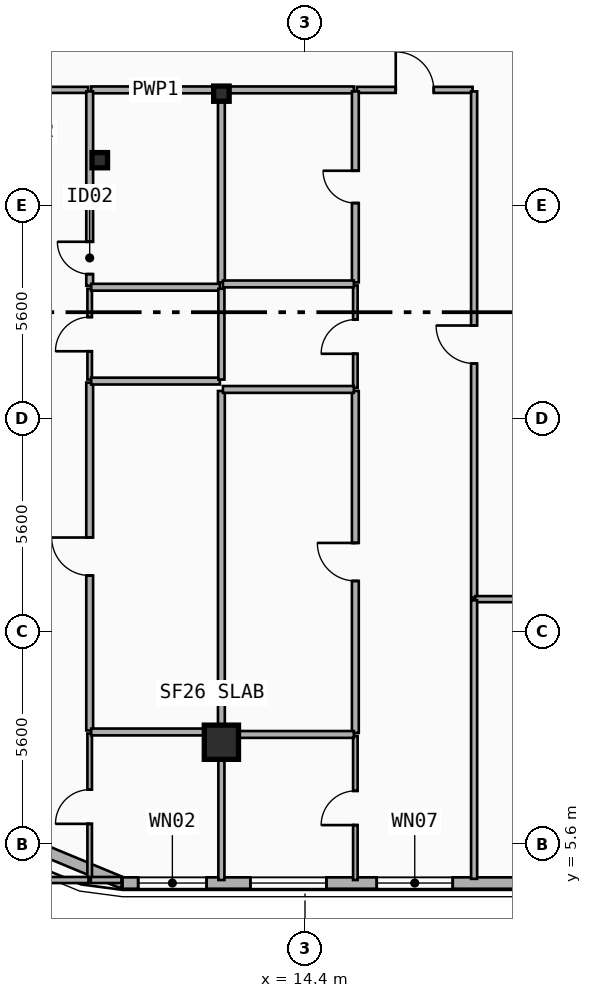
"""IFC4 building model, lengths in metres.
Left out: names, types, materials, properties, quantities, classifications, styles, units other than length and angle.
Written with IfcOpenShell. Run it as: python <this file> out.ifc"""

import sys

from ifc_helpers import new_model, si_unit, direction, frame, frame_2d, origin, origin_2d, place, context, subcontext, project, spatial, rectangle, i_section, extrude, element, fill, save


model = new_model("IFC4")
c1 = context("Model", 3, precision=1e-05, world=origin(), true_north=direction((0.0, 1.0)))
c2 = subcontext(c1, "Body", "Model", "MODEL_VIEW")
j1 = project(units=[si_unit("LENGTHUNIT", "METRE"), si_unit("PLANEANGLEUNIT", "RADIAN")], contexts=[c1])
p1 = place(None, origin())
s1 = spatial("IfcSite", under=j1, at=p1, CompositionType="ELEMENT")
p2 = place(p1, origin())
s2 = spatial("IfcBuilding", under=s1, at=p2, CompositionType="ELEMENT")
p3 = place(p2, frame((0.0, 0.0, 196.8)))
s3 = spatial("IfcBuildingStorey", under=s2, at=p3, CompositionType="ELEMENT", Elevation=196.8)
p4 = place(p3, frame((12.2, 25.35, 0.0), z_axis=(0.0, 0.0, 1.0), x_axis=(1.0, 0.0, 0.0)))
e1 = element("IfcColumn", 1, at=p4, inside=s3, PredefinedType="COLUMN", context=c2, shape_type="SweptSolid", body=[
    extrude(i_section(OverallWidth=0.408, OverallDepth=0.4, WebThickness=0.025, FlangeThickness=0.039, FilletRadius=0.015, at=origin_2d()), origin(), (0.0, 0.0, 1.0), 3.6),
])
p5 = place(p3, frame((12.2, 8.394, 0.0), z_axis=(0.0, -0.090304327479, 0.99591421741), x_axis=(1.0, 0.0, 0.0)))
e2 = element("IfcColumn", 2, at=p5, inside=s3, PredefinedType="COLUMN", context=c2, shape_type="SweptSolid", body=[
    extrude(rectangle(XDim=0.9, YDim=0.9, at=origin_2d()), origin(), (0.0, 0.0, 1.0), 3.615),
])
p6 = place(p3, frame((9.0, 23.6, 0.0), z_axis=(0.0, 0.0, 1.0), x_axis=(1.0, 0.0, 0.0)))
e3 = element("IfcColumn", 3, at=p6, inside=s3, PredefinedType="COLUMN", context=c2, shape_type="SweptSolid", body=[
    extrude(i_section(OverallWidth=0.408, OverallDepth=0.4, WebThickness=0.025, FlangeThickness=0.039, FilletRadius=0.015, at=origin_2d()), origin(), (0.0, 0.0, 1.0), 3.6),
])
p7 = place(p3, frame((9.6, 4.58, 0.0), z_axis=(0.0, 0.0, 1.0), x_axis=(-0.923910464346, 0.382608747773, 0.0)))
e4 = element("IfcWall", 4, at=p7, inside=s3, PredefinedType="SOLIDWALL", context=c2, shape_type="SweptSolid", body=[
    extrude(rectangle(XDim=3.077, YDim=0.3, at=frame_2d((1.539, 0.0))), origin(), (0.0, 0.0, 1.0), 3.34),
])
p8 = place(p3, frame((48.0, 4.58, 0.0), z_axis=(0.0, 0.0, 1.0), x_axis=(-1.0, 0.0, 0.0)))
e5 = element("IfcWall", 5, at=p8, inside=s3, PredefinedType="SOLIDWALL", context=c2, shape_type="SweptSolid", body=[
    extrude(rectangle(XDim=38.4, YDim=0.3, at=frame_2d((19.2, 0.0))), origin(), (0.0, 0.0, 1.0), 3.34),
])
p9 = place(p8, frame((36.19, 0.0, 0.8)))
e6 = element("IfcOpeningElement", 6, at=p9, cuts=e5, PredefinedType="OPENING", context=c2, shape_type="SweptSolid", body=[
    extrude(rectangle(XDim=1.8, YDim=1.8, at=frame_2d((0.9, 0.9))), frame((0.0, 0.16, 0.0), z_axis=(0.0, -1.0, 0.0), x_axis=(1.0, 0.0, 0.0)), (0.0, 0.0, 1.0), 0.32),
])
p10 = place(p8, frame((29.712, 0.0, 0.7)))
e7 = element("IfcOpeningElement", 7, at=p10, cuts=e5, PredefinedType="OPENING", context=c2, shape_type="SweptSolid", body=[
    extrude(rectangle(XDim=2.0, YDim=2.2, at=frame_2d((1.0, 1.1))), frame((0.0, 0.16, 0.0), z_axis=(0.0, -1.0, 0.0), x_axis=(1.0, 0.0, 0.0)), (0.0, 0.0, 1.0), 0.32),
])
p11 = place(p8, frame((33.038, 0.0, 0.7)))
e8 = element("IfcOpeningElement", 8, at=p11, cuts=e5, PredefinedType="OPENING", context=c2, shape_type="SweptSolid", body=[
    extrude(rectangle(XDim=2.0, YDim=2.2, at=frame_2d((1.0, 1.1))), frame((0.0, 0.16, 0.0), z_axis=(0.0, -1.0, 0.0), x_axis=(1.0, 0.0, 0.0)), (0.0, 0.0, 1.0), 0.32),
])
p12 = place(p8, frame((20.0, 0.0, 0.7)))
e9 = element("IfcOpeningElement", 9, at=p12, cuts=e5, PredefinedType="OPENING", context=c2, shape_type="SweptSolid", body=[
    extrude(rectangle(XDim=2.0, YDim=2.2, at=frame_2d((1.0, 1.1))), frame((0.0, 0.16, 0.0), z_axis=(0.0, -1.0, 0.0), x_axis=(1.0, 0.0, 0.0)), (0.0, 0.0, 1.0), 0.32),
])
p13 = place(p8, frame((25.2, 0.0, 0.7)))
e10 = element("IfcOpeningElement", 10, at=p13, cuts=e5, PredefinedType="OPENING", context=c2, shape_type="SweptSolid", body=[
    extrude(rectangle(XDim=2.0, YDim=2.2, at=frame_2d((1.0, 1.1))), frame((0.0, 0.16, 0.0), z_axis=(0.0, -1.0, 0.0), x_axis=(1.0, 0.0, 0.0)), (0.0, 0.0, 1.0), 0.32),
])
p14 = place(p8, frame((13.4, 0.0, 0.7)))
e11 = element("IfcOpeningElement", 11, at=p14, cuts=e5, PredefinedType="OPENING", context=c2, shape_type="SweptSolid", body=[
    extrude(rectangle(XDim=2.0, YDim=2.2, at=frame_2d((1.0, 1.1))), frame((0.0, 0.16, 0.0), z_axis=(0.0, -1.0, 0.0), x_axis=(1.0, 0.0, 0.0)), (0.0, 0.0, 1.0), 0.32),
])
p15 = place(p8, frame((6.993, 0.0, 0.7)))
e12 = element("IfcOpeningElement", 12, at=p15, cuts=e5, PredefinedType="OPENING", context=c2, shape_type="SweptSolid", body=[
    extrude(rectangle(XDim=2.0, YDim=2.2, at=frame_2d((1.0, 1.1))), frame((0.0, 0.16, 0.0), z_axis=(0.0, -1.0, 0.0), x_axis=(1.0, 0.0, 0.0)), (0.0, 0.0, 1.0), 0.32),
])
p16 = place(p8, frame((3.469, 0.0, 0.7)))
e13 = element("IfcOpeningElement", 13, at=p16, cuts=e5, PredefinedType="OPENING", context=c2, shape_type="SweptSolid", body=[
    extrude(rectangle(XDim=2.0, YDim=2.2, at=frame_2d((1.0, 1.1))), frame((0.0, 0.16, 0.0), z_axis=(0.0, -1.0, 0.0), x_axis=(1.0, 0.0, 0.0)), (0.0, 0.0, 1.0), 0.32),
])
p17 = place(p8, frame((0.41, 0.0, 0.8)))
e14 = element("IfcOpeningElement", 14, at=p17, cuts=e5, PredefinedType="OPENING", context=c2, shape_type="SweptSolid", body=[
    extrude(rectangle(XDim=1.8, YDim=1.8, at=frame_2d((0.9, 0.9))), frame((0.0, 0.16, 0.0), z_axis=(0.0, -1.0, 0.0), x_axis=(1.0, 0.0, 0.0)), (0.0, 0.0, 1.0), 0.32),
])
p18 = place(p3, frame((5.66, 25.45, 0.0), z_axis=(0.0, 0.0, 1.0), x_axis=(1.0, 0.0, 0.0)))
e15 = element("IfcWall", 15, at=p18, inside=s3, PredefinedType="PARTITIONING", context=c2, shape_type="SweptSolid", body=[
    extrude(rectangle(XDim=3.034, YDim=0.16, at=frame_2d((1.517, 0.0))), origin(), (0.0, 0.0, 1.0), 2.67),
])
p19 = place(p18, frame((1.017, 0.0, 0.0)))
e16 = element("IfcOpeningElement", 16, at=p19, cuts=e15, PredefinedType="OPENING", context=c2, shape_type="SweptSolid", body=[
    extrude(rectangle(XDim=1.0, YDim=2.15, at=frame_2d((0.5, 1.075))), frame((0.0, 0.09, 0.0), z_axis=(0.0, -1.0, 0.0), x_axis=(1.0, 0.0, 0.0)), (0.0, 0.0, 1.0), 0.18),
])
p20 = place(p3, frame((8.774, 25.45, 0.0), z_axis=(0.0, 0.0, 1.0), x_axis=(1.0, 0.0, 0.0)))
e17 = element("IfcWall", 17, at=p20, inside=s3, PredefinedType="PLUMBINGWALL", context=c2, shape_type="SweptSolid", body=[
    extrude(rectangle(XDim=3.386, YDim=0.18, at=frame_2d((1.693, 0.0))), origin(), (0.0, 0.0, 1.0), 2.42),
])
p21 = place(p3, frame((15.765, 25.45, 0.0), z_axis=(0.0, 0.0, 1.0), x_axis=(1.0, 0.0, 0.0)))
e18 = element("IfcWall", 18, at=p21, inside=s3, PredefinedType="PARTITIONING", context=c2, shape_type="SweptSolid", body=[
    extrude(rectangle(XDim=3.045, YDim=0.16, at=frame_2d((1.522, 0.0))), origin(), (0.0, 0.0, 1.0), 3.34),
])
p22 = place(p21, frame((1.022, 0.0, 0.0)))
e19 = element("IfcOpeningElement", 19, at=p22, cuts=e18, PredefinedType="OPENING", context=c2, shape_type="SweptSolid", body=[
    extrude(rectangle(XDim=1.0, YDim=2.15, at=frame_2d((0.5, 1.075))), frame((0.0, 0.09, 0.0), z_axis=(0.0, -1.0, 0.0), x_axis=(1.0, 0.0, 0.0)), (0.0, 0.0, 1.0), 0.18),
])
p23 = place(p3, frame((12.24, 25.45, 0.0), z_axis=(0.0, 0.0, 1.0), x_axis=(1.0, 0.0, 0.0)))
e20 = element("IfcWall", 20, at=p23, inside=s3, PredefinedType="PLUMBINGWALL", context=c2, shape_type="SweptSolid", body=[
    extrude(rectangle(XDim=3.445, YDim=0.18, at=frame_2d((1.723, 0.0))), origin(), (0.0, 0.0, 1.0), 2.42),
])
p24 = place(p3, frame((18.85, 12.09, 0.0), z_axis=(0.0, 0.0, 1.0), x_axis=(0.0, 1.0, 0.0)))
e21 = element("IfcWall", 21, at=p24, inside=s3, PredefinedType="PARTITIONING", context=c2, shape_type="SweptSolid", body=[
    extrude(rectangle(XDim=13.32, YDim=0.16, at=frame_2d((6.66, 0.0))), origin(), (0.0, 0.0, 1.0), 2.87),
])
p25 = place(p24, frame((6.16, 0.0, 0.0)))
e22 = element("IfcOpeningElement", 22, at=p25, cuts=e21, PredefinedType="OPENING", context=c2, shape_type="SweptSolid", body=[
    extrude(rectangle(XDim=1.0, YDim=2.15, at=frame_2d((0.5, 1.075))), frame((0.0, 0.09, 0.0), z_axis=(0.0, -1.0, 0.0), x_axis=(1.0, 0.0, 0.0)), (0.0, 0.0, 1.0), 0.18),
])
p26 = place(p3, frame((8.734, 4.66, 0.0), z_axis=(0.0, 0.0, 1.0), x_axis=(0.0, 1.0, 0.0)))
e23 = element("IfcWall", 23, at=p26, inside=s3, PredefinedType="PARTITIONING", context=c2, shape_type="SweptSolid", body=[
    extrude(rectangle(XDim=3.855, YDim=0.12, at=frame_2d((1.927, 0.0))), origin(), (0.0, 0.0, 1.0), 3.34),
])
p27 = place(p26, frame((1.478, 0.0, 0.0)))
e24 = element("IfcOpeningElement", 24, at=p27, cuts=e23, PredefinedType="OPENING", context=c2, shape_type="SweptSolid", body=[
    extrude(rectangle(XDim=0.9, YDim=2.1, at=frame_2d((0.45, 1.05))), frame((0.0, 0.07, 0.0), z_axis=(0.0, -1.0, 0.0), x_axis=(1.0, 0.0, 0.0)), (0.0, 0.0, 1.0), 0.14),
])
p28 = place(p3, frame((8.734, 8.595, 0.0), z_axis=(0.0, 0.0, 1.0), x_axis=(0.0, 1.0, 0.0)))
e25 = element("IfcWall", 25, at=p28, inside=s3, PredefinedType="PLUMBINGWALL", context=c2, shape_type="SweptSolid", body=[
    extrude(rectangle(XDim=9.153, YDim=0.18, at=frame_2d((4.577, 0.0))), origin(), (0.0, 0.0, 1.0), 2.82),
])
p29 = place(p28, frame((4.076, 0.0, 0.0)))
e26 = element("IfcOpeningElement", 26, at=p29, cuts=e25, PredefinedType="OPENING", context=c2, shape_type="SweptSolid", body=[
    extrude(rectangle(XDim=1.0, YDim=2.15, at=frame_2d((0.5, 1.075))), frame((0.0, 0.1, 0.0), z_axis=(0.0, -1.0, 0.0), x_axis=(1.0, 0.0, 0.0)), (0.0, 0.0, 1.0), 0.2),
])
p30 = place(p3, frame((8.734, 17.828, 0.0), z_axis=(0.0, 0.0, 1.0), x_axis=(0.0, 1.0, 0.0)))
e27 = element("IfcWall", 27, at=p30, inside=s3, PredefinedType="PARTITIONING", context=c2, shape_type="SweptSolid", body=[
    extrude(rectangle(XDim=2.389, YDim=0.12, at=frame_2d((1.195, 0.0))), origin(), (0.0, 0.0, 1.0), 2.82),
])
p31 = place(p30, frame((0.744, 0.0, 0.0)))
e28 = element("IfcOpeningElement", 28, at=p31, cuts=e27, PredefinedType="OPENING", context=c2, shape_type="SweptSolid", body=[
    extrude(rectangle(XDim=0.9, YDim=2.1, at=frame_2d((0.45, 1.05))), frame((0.0, 0.07, 0.0), z_axis=(0.0, -1.0, 0.0), x_axis=(1.0, 0.0, 0.0)), (0.0, 0.0, 1.0), 0.14),
])
p32 = place(p3, frame((8.734, 20.297, 0.0), z_axis=(0.0, 0.0, 1.0), x_axis=(0.0, 1.0, 0.0)))
e29 = element("IfcWall", 29, at=p32, inside=s3, PredefinedType="PLUMBINGWALL", context=c2, shape_type="SweptSolid", body=[
    extrude(rectangle(XDim=5.113, YDim=0.18, at=frame_2d((2.556, 0.0))), origin(), (0.0, 0.0, 1.0), 2.82),
])
p33 = place(p32, frame((0.306, 0.0, 0.0)))
e30 = element("IfcOpeningElement", 30, at=p33, cuts=e29, PredefinedType="OPENING", context=c2, shape_type="SweptSolid", body=[
    extrude(rectangle(XDim=0.85, YDim=2.1, at=frame_2d((0.425, 1.05))), frame((0.0, 0.1, 0.0), z_axis=(0.0, -1.0, 0.0), x_axis=(1.0, 0.0, 0.0)), (0.0, 0.0, 1.0), 0.2),
])
p34 = place(p3, frame((8.774, 8.555, 0.0), z_axis=(0.0, 0.0, 1.0), x_axis=(1.0, 0.0, 0.0)))
e31 = element("IfcWall", 31, at=p34, inside=s3, PredefinedType="PLUMBINGWALL", context=c2, shape_type="SweptSolid", body=[
    extrude(rectangle(XDim=3.386, YDim=0.18, at=frame_2d((1.693, 0.0))), origin(), (0.0, 0.0, 1.0), 2.42),
])
p35 = place(p3, frame((12.2, 4.66, 0.0), z_axis=(0.0, 0.0, 1.0), x_axis=(0.0, 1.0, 0.0)))
e32 = element("IfcWall", 32, at=p35, inside=s3, PredefinedType="PARTITIONING", context=c2, shape_type="SweptSolid", body=[
    extrude(rectangle(XDim=3.79, YDim=0.16, at=frame_2d((1.895, 0.0))), origin(), (0.0, 0.0, 1.0), 2.42),
])
p36 = place(p3, frame((8.774, 17.788, 0.0), z_axis=(0.0, 0.0, 1.0), x_axis=(1.0, 0.0, 0.0)))
e33 = element("IfcWall", 33, at=p36, inside=s3, PredefinedType="PLUMBINGWALL", context=c2, shape_type="SweptSolid", body=[
    extrude(rectangle(XDim=3.386, YDim=0.18, at=frame_2d((1.693, 0.0))), origin(), (0.0, 0.0, 1.0), 2.42),
])
p37 = place(p3, frame((12.2, 8.595, 0.0), z_axis=(0.0, 0.0, 1.0), x_axis=(0.0, 1.0, 0.0)))
e34 = element("IfcWall", 34, at=p37, inside=s3, PredefinedType="PLUMBINGWALL", context=c2, shape_type="SweptSolid", body=[
    extrude(rectangle(XDim=8.933, YDim=0.18, at=frame_2d((4.467, 0.0))), origin(), (0.0, 0.0, 1.0), 2.42),
])
p38 = place(p3, frame((8.774, 20.257, 0.0), z_axis=(0.0, 0.0, 1.0), x_axis=(1.0, 0.0, 0.0)))
e35 = element("IfcWall", 35, at=p38, inside=s3, PredefinedType="PLUMBINGWALL", context=c2, shape_type="SweptSolid", body=[
    extrude(rectangle(XDim=3.386, YDim=0.18, at=frame_2d((1.693, 0.0))), origin(), (0.0, 0.0, 1.0), 2.42),
])
p39 = place(p3, frame((12.2, 17.828, 0.0), z_axis=(0.0, 0.0, 1.0), x_axis=(0.0, 1.0, 0.0)))
e36 = element("IfcWall", 36, at=p39, inside=s3, PredefinedType="PARTITIONING", context=c2, shape_type="SweptSolid", body=[
    extrude(rectangle(XDim=2.389, YDim=0.16, at=frame_2d((1.195, 0.0))), origin(), (0.0, 0.0, 1.0), 2.42),
])
p40 = place(p3, frame((12.2, 20.384, 0.0), z_axis=(0.0, 0.0, 1.0), x_axis=(0.0, 1.0, 0.0)))
e37 = element("IfcWall", 37, at=p40, inside=s3, PredefinedType="PLUMBINGWALL", context=c2, shape_type="SweptSolid", body=[
    extrude(rectangle(XDim=5.026, YDim=0.18, at=frame_2d((2.513, 0.0))), origin(), (0.0, 0.0, 1.0), 2.42),
])
p41 = place(p3, frame((15.725, 4.66, 0.0), z_axis=(0.0, 0.0, 1.0), x_axis=(0.0, 1.0, 0.0)))
e38 = element("IfcWall", 38, at=p41, inside=s3, PredefinedType="PARTITIONING", context=c2, shape_type="SweptSolid", body=[
    extrude(rectangle(XDim=3.79, YDim=0.12, at=frame_2d((1.895, 0.0))), origin(), (0.0, 0.0, 1.0), 3.0),
])
p42 = place(p41, frame((1.445, 0.0, 0.0)))
e39 = element("IfcOpeningElement", 39, at=p42, cuts=e38, PredefinedType="OPENING", context=c2, shape_type="SweptSolid", body=[
    extrude(rectangle(XDim=0.9, YDim=2.1, at=frame_2d((0.45, 1.05))), frame((0.0, 0.07, 0.0), z_axis=(0.0, -1.0, 0.0), x_axis=(1.0, 0.0, 0.0)), (0.0, 0.0, 1.0), 0.14),
])
p43 = place(p3, frame((15.725, 8.53, 0.0), z_axis=(0.0, 0.0, 1.0), x_axis=(0.0, 1.0, 0.0)))
e40 = element("IfcWall", 40, at=p43, inside=s3, PredefinedType="PLUMBINGWALL", context=c2, shape_type="SweptSolid", body=[
    extrude(rectangle(XDim=8.998, YDim=0.18, at=frame_2d((4.499, 0.0))), origin(), (0.0, 0.0, 1.0), 2.87),
])
p44 = place(p43, frame((3.999, 0.0, 0.0)))
e41 = element("IfcOpeningElement", 41, at=p44, cuts=e40, PredefinedType="OPENING", context=c2, shape_type="SweptSolid", body=[
    extrude(rectangle(XDim=1.0, YDim=2.15, at=frame_2d((0.5, 1.075))), frame((0.0, 0.1, 0.0), z_axis=(0.0, -1.0, 0.0), x_axis=(1.0, 0.0, 0.0)), (0.0, 0.0, 1.0), 0.2),
])
p45 = place(p3, frame((15.725, 17.608, 0.0), z_axis=(0.0, 0.0, 1.0), x_axis=(0.0, 1.0, 0.0)))
e42 = element("IfcWall", 42, at=p45, inside=s3, PredefinedType="PARTITIONING", context=c2, shape_type="SweptSolid", body=[
    extrude(rectangle(XDim=2.696, YDim=0.12, at=frame_2d((1.348, 0.0))), origin(), (0.0, 0.0, 1.0), 2.87),
])
p46 = place(p45, frame((0.898, 0.0, 0.0)))
e43 = element("IfcOpeningElement", 43, at=p46, cuts=e42, PredefinedType="OPENING", context=c2, shape_type="SweptSolid", body=[
    extrude(rectangle(XDim=0.9, YDim=2.1, at=frame_2d((0.45, 1.05))), frame((0.0, 0.07, 0.0), z_axis=(0.0, -1.0, 0.0), x_axis=(1.0, 0.0, 0.0)), (0.0, 0.0, 1.0), 0.14),
])
p47 = place(p3, frame((15.725, 20.384, 0.0), z_axis=(0.0, 0.0, 1.0), x_axis=(0.0, 1.0, 0.0)))
e44 = element("IfcWall", 44, at=p47, inside=s3, PredefinedType="PLUMBINGWALL", context=c2, shape_type="SweptSolid", body=[
    extrude(rectangle(XDim=5.026, YDim=0.18, at=frame_2d((2.513, 0.0))), origin(), (0.0, 0.0, 1.0), 2.88),
])
p48 = place(p47, frame((2.088, 0.0, 0.0)))
e45 = element("IfcOpeningElement", 45, at=p48, cuts=e44, PredefinedType="OPENING", context=c2, shape_type="SweptSolid", body=[
    extrude(rectangle(XDim=0.85, YDim=2.1, at=frame_2d((0.425, 1.05))), frame((0.0, 0.1, 0.0), z_axis=(0.0, -1.0, 0.0), x_axis=(1.0, 0.0, 0.0)), (0.0, 0.0, 1.0), 0.2),
])
for number, where, z_axis, x_axis in (
    (46, (12.24, 8.49, 0.0), (0.0, 0.0, 1.0), (1.0, 0.0, 0.0)),
    (47, (12.24, 17.568, 0.0), (0.0, 0.0, 1.0), (1.0, 0.0, 0.0)),
    (48, (12.24, 20.344, 0.0), (0.0, 0.0, 1.0), (1.0, 0.0, 0.0)),
):
    element("IfcWall", number, at=place(p3, frame(where, z_axis=z_axis, x_axis=x_axis)), inside=s3, PredefinedType="PLUMBINGWALL", context=c2, shape_type="SweptSolid", body=[
        extrude(rectangle(XDim=3.445, YDim=0.18, at=frame_2d((1.723, 0.0))), origin(), (0.0, 0.0, 1.0), 2.42),
    ])
p49 = place(p3, frame((18.88, 12.05, 0.0), z_axis=(0.0, 0.0, 1.0), x_axis=(1.0, 0.0, 0.0)))
e49 = element("IfcWall", 49, at=p49, inside=s3, PredefinedType="PARTITIONING", context=c2, shape_type="SweptSolid", body=[
    extrude(rectangle(XDim=1.54, YDim=0.16, at=frame_2d((0.77, 0.0))), origin(), (0.0, 0.0, 1.0), 2.87),
])
p50 = place(p3, frame((5.69, 4.66, 0.0), z_axis=(0.0, 0.0, 1.0), x_axis=(1.0, 0.0, 0.0)))
e50 = element("IfcWall", 50, at=p50, inside=s3, PredefinedType="PARTITIONING", context=c2, shape_type="SweptSolid", body=[
    extrude(rectangle(XDim=3.014, YDim=0.16, at=frame_2d((1.507, 0.0))), origin(), (0.0, 0.0, 1.0), 3.34),
])
p51 = place(p3, frame((8.764, 4.66, 0.0), z_axis=(0.0, 0.0, 1.0), x_axis=(1.0, 0.0, 0.0)))
e51 = element("IfcWall", 51, at=p51, inside=s3, PredefinedType="PARTITIONING", context=c2, shape_type="SweptSolid", body=[
    extrude(rectangle(XDim=0.806, YDim=0.16, at=frame_2d((0.403, 0.0))), origin(), (0.0, 0.0, 1.0), 3.34),
])
p52 = place(p3, frame((18.85, 4.69, 0.0), z_axis=(0.0, 0.0, 1.0), x_axis=(0.0, 1.0, 0.0)))
e52 = element("IfcWall", 52, at=p52, inside=s3, PredefinedType="PARTITIONING", context=c2, shape_type="SweptSolid", body=[
    extrude(rectangle(XDim=7.33, YDim=0.16, at=frame_2d((3.665, 0.0))), origin(), (0.0, 0.0, 1.0), 2.87),
])
p53 = place(p9, origin())
e53 = element("IfcWindow", 53, at=p53, inside=s3, PartitioningType="SINGLE_PANEL", PredefinedType="WINDOW", context=c2, shape_type="SweptSolid", body=[
    extrude(rectangle(XDim=1.8, YDim=1.8, at=frame_2d((0.9, 0.9))), frame((0.0, 0.03, 0.0), z_axis=(0.0, -1.0, 0.0), x_axis=(1.0, 0.0, 0.0)), (0.0, 0.0, 1.0), 0.06),
])
fill(e6, e53)
p54 = place(p10, origin())
e54 = element("IfcWindow", 54, at=p54, inside=s3, PartitioningType="SINGLE_PANEL", PredefinedType="WINDOW", context=c2, shape_type="SweptSolid", body=[
    extrude(rectangle(XDim=2.0, YDim=2.2, at=frame_2d((1.0, 1.1))), frame((0.0, 0.03, 0.0), z_axis=(0.0, -1.0, 0.0), x_axis=(1.0, 0.0, 0.0)), (0.0, 0.0, 1.0), 0.06),
])
fill(e7, e54)
p55 = place(p11, origin())
e55 = element("IfcWindow", 55, at=p55, inside=s3, PartitioningType="SINGLE_PANEL", PredefinedType="WINDOW", context=c2, shape_type="SweptSolid", body=[
    extrude(rectangle(XDim=2.0, YDim=2.2, at=frame_2d((1.0, 1.1))), frame((0.0, 0.03, 0.0), z_axis=(0.0, -1.0, 0.0), x_axis=(1.0, 0.0, 0.0)), (0.0, 0.0, 1.0), 0.06),
])
fill(e8, e55)
p56 = place(p22, origin())
e56 = element("IfcDoor", 56, at=p56, inside=s3, OperationType="SINGLE_SWING_LEFT", PredefinedType="DOOR", context=c2, shape_type="SweptSolid", body=[
    extrude(rectangle(XDim=1.0, YDim=2.15, at=frame_2d((0.5, 1.075))), frame((0.0, 0.025, 0.0), z_axis=(0.0, -1.0, 0.0), x_axis=(1.0, 0.0, 0.0)), (0.0, 0.0, 1.0), 0.05),
])
fill(e19, e56)
p57 = place(p25, origin())
e57 = element("IfcDoor", 57, at=p57, inside=s3, OperationType="SINGLE_SWING_RIGHT", PredefinedType="DOOR", context=c2, shape_type="SweptSolid", body=[
    extrude(rectangle(XDim=1.0, YDim=2.15, at=frame_2d((0.5, 1.075))), frame((0.0, 0.025, 0.0), z_axis=(0.0, -1.0, 0.0), x_axis=(1.0, 0.0, 0.0)), (0.0, 0.0, 1.0), 0.05),
])
fill(e22, e57)
p58 = place(p27, origin())
e58 = element("IfcDoor", 58, at=p58, inside=s3, OperationType="SINGLE_SWING_LEFT", PredefinedType="DOOR", context=c2, shape_type="SweptSolid", body=[
    extrude(rectangle(XDim=0.9, YDim=2.1, at=frame_2d((0.45, 1.05))), frame((0.0, 0.025, 0.0), z_axis=(0.0, -1.0, 0.0), x_axis=(1.0, 0.0, 0.0)), (0.0, 0.0, 1.0), 0.05),
])
fill(e24, e58)
p59 = place(p29, origin())
e59 = element("IfcDoor", 59, at=p59, inside=s3, OperationType="SINGLE_SWING_RIGHT", PredefinedType="DOOR", context=c2, shape_type="SweptSolid", body=[
    extrude(rectangle(XDim=1.0, YDim=2.15, at=frame_2d((0.5, 1.075))), frame((0.0, 0.025, 0.0), z_axis=(0.0, -1.0, 0.0), x_axis=(1.0, 0.0, 0.0)), (0.0, 0.0, 1.0), 0.05),
])
fill(e26, e59)
p60 = place(p31, origin())
e60 = element("IfcDoor", 60, at=p60, inside=s3, OperationType="SINGLE_SWING_LEFT", PredefinedType="DOOR", context=c2, shape_type="SweptSolid", body=[
    extrude(rectangle(XDim=0.9, YDim=2.1, at=frame_2d((0.45, 1.05))), frame((0.0, 0.025, 0.0), z_axis=(0.0, -1.0, 0.0), x_axis=(1.0, 0.0, 0.0)), (0.0, 0.0, 1.0), 0.05),
])
fill(e28, e60)
p61 = place(p33, origin())
e61 = element("IfcDoor", 61, at=p61, inside=s3, OperationType="SINGLE_SWING_RIGHT", PredefinedType="DOOR", context=c2, shape_type="SweptSolid", body=[
    extrude(rectangle(XDim=0.85, YDim=2.1, at=frame_2d((0.425, 1.05))), frame((0.0, 0.025, 0.0), z_axis=(0.0, -1.0, 0.0), x_axis=(1.0, 0.0, 0.0)), (0.0, 0.0, 1.0), 0.05),
])
fill(e30, e61)
p62 = place(p42, origin())
e62 = element("IfcDoor", 62, at=p62, inside=s3, OperationType="SINGLE_SWING_LEFT", PredefinedType="DOOR", context=c2, shape_type="SweptSolid", body=[
    extrude(rectangle(XDim=0.9, YDim=2.1, at=frame_2d((0.45, 1.05))), frame((0.0, 0.025, 0.0), z_axis=(0.0, -1.0, 0.0), x_axis=(1.0, 0.0, 0.0)), (0.0, 0.0, 1.0), 0.05),
])
fill(e39, e62)
p63 = place(p44, origin())
e63 = element("IfcDoor", 63, at=p63, inside=s3, OperationType="SINGLE_SWING_RIGHT", PredefinedType="DOOR", context=c2, shape_type="SweptSolid", body=[
    extrude(rectangle(XDim=1.0, YDim=2.15, at=frame_2d((0.5, 1.075))), frame((0.0, 0.025, 0.0), z_axis=(0.0, -1.0, 0.0), x_axis=(1.0, 0.0, 0.0)), (0.0, 0.0, 1.0), 0.05),
])
fill(e41, e63)
p64 = place(p46, origin())
e64 = element("IfcDoor", 64, at=p64, inside=s3, OperationType="SINGLE_SWING_LEFT", PredefinedType="DOOR", context=c2, shape_type="SweptSolid", body=[
    extrude(rectangle(XDim=0.9, YDim=2.1, at=frame_2d((0.45, 1.05))), frame((0.0, 0.025, 0.0), z_axis=(0.0, -1.0, 0.0), x_axis=(1.0, 0.0, 0.0)), (0.0, 0.0, 1.0), 0.05),
])
fill(e43, e64)
p65 = place(p48, origin())
e65 = element("IfcDoor", 65, at=p65, inside=s3, OperationType="SINGLE_SWING_RIGHT", PredefinedType="DOOR", context=c2, shape_type="SweptSolid", body=[
    extrude(rectangle(XDim=0.85, YDim=2.1, at=frame_2d((0.425, 1.05))), frame((0.0, 0.025, 0.0), z_axis=(0.0, -1.0, 0.0), x_axis=(1.0, 0.0, 0.0)), (0.0, 0.0, 1.0), 0.05),
])
fill(e45, e65)
save(model, sys.argv[1])
